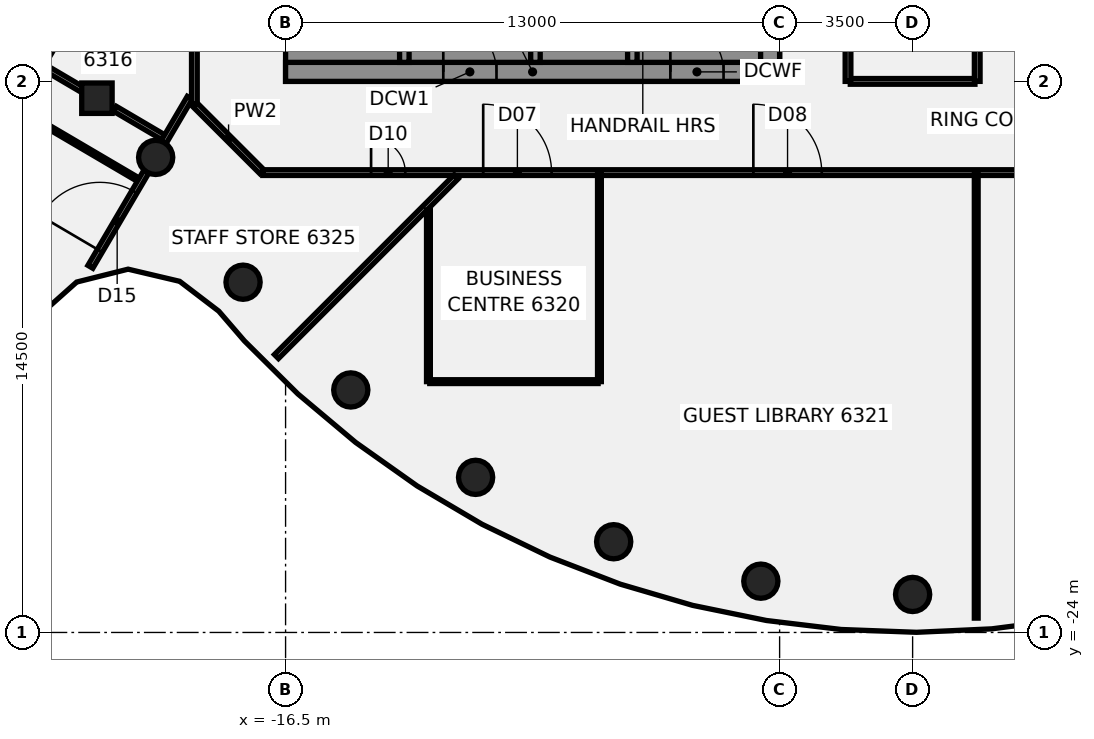
"""IFC4 building model, lengths in metres.
Left out: names, types, materials, properties, quantities, classifications, styles, units other than length and angle.
Written with IfcOpenShell. Run it as: python <this file> out.ifc"""

import sys

from ifc_helpers import new_model, si_unit, direction, frame, frame_2d, origin, origin_2d, place, context, subcontext, project, spatial, polyline, rectangle, circle, outline, extrude, element, fill, save


model = new_model("IFC4")
c1 = context("Model", 3, precision=1e-05, world=origin(), true_north=direction((0.0, 1.0)))
c2 = subcontext(c1, "Body", "Model", "MODEL_VIEW")
j1 = project(units=[si_unit("LENGTHUNIT", "METRE"), si_unit("PLANEANGLEUNIT", "RADIAN")], contexts=[c1])
p1 = place(None, origin())
s1 = spatial("IfcSite", under=j1, at=p1, CompositionType="ELEMENT")
p2 = place(p1, origin())
s2 = spatial("IfcBuilding", under=s1, at=p2, CompositionType="ELEMENT")
p3 = place(p2, frame((0.0, 0.0, 248.7)))
s3 = spatial("IfcBuildingStorey", under=s2, at=p3, CompositionType="ELEMENT", Elevation=248.7)
for number, where, z_axis, x_axis in (
    (1, (-19.919, -11.5, -0.14), (0.0, 0.0, 1.0), (1.0, 0.0, 0.0)),
    (2, (-17.619, -14.784, -0.14), (0.0, 0.0, 1.0), (1.0, 0.0, 0.0)),
    (3, (-14.784, -17.619, -0.14), (0.0, 0.0, 1.0), (1.0, 0.0, 0.0)),
    (4, (-11.5, -19.919, -0.14), (0.0, 0.0, 1.0), (1.0, 0.0, 0.0)),
    (5, (-7.866, -21.613, -0.14), (0.0, 0.0, 1.0), (1.0, 0.0, 0.0)),
    (6, (-3.994, -22.651, -0.14), (0.0, 0.0, 1.0), (1.0, 0.0, 0.0)),
    (7, (0.0, -23.0, -0.14), (0.0, 0.0, 1.0), (1.0, 0.0, 0.0)),
):
    element("IfcColumn", number, at=place(p3, frame(where, z_axis=z_axis, x_axis=x_axis)), inside=s3, PredefinedType="COLUMN", context=c2, shape_type="SweptSolid", body=[
        extrude(circle(Radius=0.45, at=origin_2d()), origin(), (0.0, 0.0, 1.0), 3.56),
    ])
p4 = place(p3, frame((-21.464, -9.942, -0.139), z_axis=(0.050846736046, 0.003165020106, 0.998701452928), x_axis=(-0.860634932562, 0.507470099414, 0.042209134729)))
e8 = element("IfcColumn", 8, at=p4, inside=s3, PredefinedType="COLUMN", context=c2, shape_type="SweptSolid", body=[
    extrude(rectangle(XDim=0.8, YDim=0.8, at=origin_2d()), origin(), (0.0, 0.0, 1.0), 3.548),
])
p5 = place(p3, frame((-18.872, -10.128, 0.0), z_axis=(0.0, 0.0, 1.0), x_axis=(0.707106781187, -0.707106781187, 0.0)))
e9 = element("IfcWall", 9, at=p5, inside=s3, PredefinedType="PARTITIONING", context=c2, shape_type="SweptSolid", body=[
    extrude(rectangle(XDim=2.465, YDim=0.15, at=frame_2d((1.232, 0.0))), origin(), (0.0, 0.0, 1.0), 2.824),
])
p6 = place(p3, frame((-27.865, -7.687, 0.0), z_axis=(0.0, 0.0, 1.0), x_axis=(0.862208691121, -0.506553228156, 0.0)))
e10 = element("IfcWall", 10, at=p6, inside=s3, PredefinedType="PARTITIONING", context=c2, shape_type="SweptSolid", body=[
    extrude(rectangle(XDim=8.685, YDim=0.1, at=frame_2d((4.343, 0.0))), origin(), (0.0, 0.0, 1.0), 2.82),
])
p7 = place(p3, frame((-26.857, -6.773, 0.0), z_axis=(0.0, 0.0, 1.0), x_axis=(0.862091797668, -0.506752140985, 0.0)))
e11 = element("IfcWall", 11, at=p7, inside=s3, PredefinedType="PARTITIONING", context=c2, shape_type="SweptSolid", body=[
    extrude(rectangle(XDim=5.853, YDim=0.15, at=frame_2d((2.927, 0.0))), origin(), (0.0, 0.0, 1.0), 2.82),
])
p8 = place(p3, frame((-20.99, -10.222, 0.0), z_axis=(0.0, 0.0, 1.0), x_axis=(0.862134928998, -0.506678758388, 0.0)))
e12 = element("IfcWall", 12, at=p8, inside=s3, PredefinedType="PARTITIONING", context=c2, shape_type="SweptSolid", body=[
    extrude(rectangle(XDim=1.469, YDim=0.15, at=frame_2d((0.735, 0.0))), origin(), (0.0, 0.0, 1.0), 2.82),
])
p9 = place(p3, frame((-17.1, -11.9, 0.0), z_axis=(0.0, 0.0, 1.0), x_axis=(1.0, 0.0, 0.0)))
e13 = element("IfcWall", 13, at=p9, inside=s3, PredefinedType="PARTITIONING", context=c2, shape_type="SweptSolid", body=[
    extrude(rectangle(XDim=34.165, YDim=0.15, at=frame_2d((17.083, 0.0))), origin(), (0.0, 0.0, 1.0), 2.824),
])
p10 = place(p9, frame((5.8, 0.0, 0.0)))
e14 = element("IfcOpeningElement", 14, at=p10, cuts=e13, PredefinedType="OPENING", context=c2, shape_type="SweptSolid", body=[
    extrude(rectangle(XDim=1.8, YDim=2.1, at=frame_2d((0.9, 1.05))), frame((0.0, 0.085, 0.0), z_axis=(0.0, -1.0, 0.0), x_axis=(1.0, 0.0, 0.0)), (0.0, 0.0, 1.0), 0.17),
])
p11 = place(p9, frame((12.909, 0.0, 0.0)))
e15 = element("IfcOpeningElement", 15, at=p11, cuts=e13, PredefinedType="OPENING", context=c2, shape_type="SweptSolid", body=[
    extrude(rectangle(XDim=1.8, YDim=2.1, at=frame_2d((0.9, 1.05))), frame((0.0, 0.085, 0.0), z_axis=(0.0, -1.0, 0.0), x_axis=(1.0, 0.0, 0.0)), (0.0, 0.0, 1.0), 0.17),
])
p12 = place(p9, frame((22.974, 0.0, 0.0)))
e16 = element("IfcOpeningElement", 16, at=p12, cuts=e13, PredefinedType="OPENING", context=c2, shape_type="SweptSolid", body=[
    extrude(rectangle(XDim=1.8, YDim=2.1, at=frame_2d((0.9, 1.05))), frame((0.0, 0.085, 0.0), z_axis=(0.0, -1.0, 0.0), x_axis=(1.0, 0.0, 0.0)), (0.0, 0.0, 1.0), 0.17),
])
p13 = place(p9, frame((2.85, 0.0, 0.0)))
e17 = element("IfcOpeningElement", 17, at=p13, cuts=e13, PredefinedType="OPENING", context=c2, shape_type="SweptSolid", body=[
    extrude(rectangle(XDim=0.9, YDim=2.1, at=frame_2d((0.45, 1.05))), frame((0.0, 0.085, 0.0), z_axis=(0.0, -1.0, 0.0), x_axis=(1.0, 0.0, 0.0)), (0.0, 0.0, 1.0), 0.17),
])
p14 = place(p3, frame((-12.706, -17.4, 0.0), z_axis=(0.0, 0.0, 1.0), x_axis=(1.0, 0.0, 0.0)))
e18 = element("IfcWall", 18, at=p14, inside=s3, PredefinedType="PARTITIONING", context=c2, shape_type="SweptSolid", body=[
    extrude(rectangle(XDim=4.43, YDim=0.1, at=frame_2d((2.215, 0.0))), origin(), (0.0, 0.0, 1.0), 2.824),
])
p15 = place(p3, frame((-1.64, -9.5, 0.0), z_axis=(0.0, 0.0, 1.0), x_axis=(1.0, 0.0, 0.0)))
e19 = element("IfcWall", 19, at=p15, inside=s3, PredefinedType="PARTITIONING", context=c2, shape_type="SweptSolid", body=[
    extrude(rectangle(XDim=3.28, YDim=0.15, at=frame_2d((1.64, 0.0))), origin(), (0.0, 0.0, 1.0), 2.824),
])
p16 = place(p3, frame((-16.74, -16.74, 0.0), z_axis=(0.0, 0.0, 1.0), x_axis=(0.707106781187, 0.707106781187, 0.0)))
e20 = element("IfcWall", 20, at=p16, inside=s3, PredefinedType="PARTITIONING", context=c2, shape_type="SweptSolid", body=[
    extrude(rectangle(XDim=6.691, YDim=0.15, at=frame_2d((3.345, 0.0))), origin(), (0.0, 0.0, 1.0), 2.824),
])
p17 = place(p3, frame((-22.892, -9.016, 0.0), z_axis=(0.0, 0.0, 1.0), x_axis=(0.506789195044, 0.862070015594, 0.0)))
e21 = element("IfcWall", 21, at=p17, inside=s3, PredefinedType="PARTITIONING", context=c2, shape_type="SweptSolid", body=[
    extrude(rectangle(XDim=2.125, YDim=0.15, at=frame_2d((1.063, 0.0))), origin(), (0.0, 0.0, 1.0), 2.72),
])
p18 = place(p3, frame((-21.637, -14.379, 0.0), z_axis=(0.0, 0.0, 1.0), x_axis=(0.506773579249, 0.862079195536, 0.0)))
e22 = element("IfcWall", 22, at=p18, inside=s3, PredefinedType="PARTITIONING", context=c2, shape_type="SweptSolid", body=[
    extrude(rectangle(XDim=2.9, YDim=0.15, at=frame_2d((1.45, 0.0))), origin(), (0.0, 0.0, 1.0), 2.824),
])
p19 = place(p18, frame((0.491, 0.0, 0.0)))
e23 = element("IfcOpeningElement", 23, at=p19, cuts=e22, PredefinedType="OPENING", context=c2, shape_type="SweptSolid", body=[
    extrude(rectangle(XDim=1.8, YDim=2.1, at=frame_2d((0.9, 1.05))), frame((0.0, 0.085, 0.0), z_axis=(0.0, -1.0, 0.0), x_axis=(1.0, 0.0, 0.0)), (0.0, 0.0, 1.0), 0.17),
])
p20 = place(p3, frame((-19.707, -11.097, 0.0), z_axis=(0.0, 0.0, 1.0), x_axis=(0.506775518667, 0.862078055445, 0.0)))
e24 = element("IfcWall", 24, at=p20, inside=s3, PredefinedType="PARTITIONING", context=c2, shape_type="SweptSolid", body=[
    extrude(rectangle(XDim=1.352, YDim=0.15, at=frame_2d((0.676, 0.0))), origin(), (0.0, 0.0, 1.0), 2.824),
])
p21 = place(p3, frame((-18.9, -10.1, 0.0), z_axis=(0.0, 0.0, 1.0), x_axis=(0.0, 1.0, 0.0)))
e25 = element("IfcWall", 25, at=p21, inside=s3, PredefinedType="PARTITIONING", context=c2, shape_type="SweptSolid", body=[
    extrude(rectangle(XDim=20.2, YDim=0.15, at=frame_2d((10.1, 0.0))), origin(), (0.0, 0.0, 1.0), 2.824),
])
p22 = place(p21, frame((14.767, 0.0, 0.0)))
e26 = element("IfcOpeningElement", 26, at=p22, cuts=e25, PredefinedType="OPENING", context=c2, shape_type="SweptSolid", body=[
    extrude(rectangle(XDim=1.8, YDim=2.1, at=frame_2d((0.9, 1.05))), frame((0.0, 0.085, 0.0), z_axis=(0.0, -1.0, 0.0), x_axis=(1.0, 0.0, 0.0)), (0.0, 0.0, 1.0), 0.17),
])
p23 = place(p21, frame((6.12, 0.0, 0.0)))
e27 = element("IfcOpeningElement", 27, at=p23, cuts=e25, PredefinedType="OPENING", context=c2, shape_type="SweptSolid", body=[
    extrude(rectangle(XDim=1.8, YDim=2.1, at=frame_2d((0.9, 1.05))), frame((0.0, 0.085, 0.0), z_axis=(0.0, -1.0, 0.0), x_axis=(1.0, 0.0, 0.0)), (0.0, 0.0, 1.0), 0.17),
])
p24 = place(p21, frame((2.026, 0.0, 0.0)))
e28 = element("IfcOpeningElement", 28, at=p24, cuts=e25, PredefinedType="OPENING", context=c2, shape_type="SweptSolid", body=[
    extrude(rectangle(XDim=0.9, YDim=2.1, at=frame_2d((0.45, 1.05))), frame((0.0, 0.085, 0.0), z_axis=(0.0, -1.0, 0.0), x_axis=(1.0, 0.0, 0.0)), (0.0, 0.0, 1.0), 0.17),
])
p25 = place(p3, frame((-12.741, -17.4, 0.0), z_axis=(0.0, 0.0, 1.0), x_axis=(0.0, 1.0, 0.0)))
e29 = element("IfcWall", 29, at=p25, inside=s3, PredefinedType="PARTITIONING", context=c2, shape_type="SweptSolid", body=[
    extrude(rectangle(XDim=4.519, YDim=0.1, at=frame_2d((2.259, 0.0))), origin(), (0.0, 0.0, 1.0), 2.824),
])
p26 = place(p3, frame((-8.241, -17.4, 0.0), z_axis=(0.0, 0.0, 1.0), x_axis=(0.0, 1.0, 0.0)))
e30 = element("IfcWall", 30, at=p26, inside=s3, PredefinedType="PARTITIONING", context=c2, shape_type="SweptSolid", body=[
    extrude(rectangle(XDim=5.445, YDim=0.1, at=frame_2d((2.722, 0.0))), origin(), (0.0, 0.0, 1.0), 2.824),
])
p27 = place(p3, frame((-1.7, -9.5, 0.0), z_axis=(0.0, 0.0, 1.0), x_axis=(0.0, 1.0, 0.0)))
e31 = element("IfcWall", 31, at=p27, inside=s3, PredefinedType="PARTITIONING", context=c2, shape_type="SweptSolid", body=[
    extrude(rectangle(XDim=19.0, YDim=0.15, at=frame_2d((9.5, 0.0))), origin(), (0.0, 0.0, 1.0), 2.824),
])
p28 = place(p27, frame((3.75, 0.0, 0.0)))
e32 = element("IfcOpeningElement", 32, at=p28, cuts=e31, PredefinedType="OPENING", context=c2, shape_type="SweptSolid", body=[
    extrude(rectangle(XDim=1.8, YDim=2.1, at=frame_2d((0.9, 1.05))), frame((0.0, 0.085, 0.0), z_axis=(0.0, -1.0, 0.0), x_axis=(1.0, 0.0, 0.0)), (0.0, 0.0, 1.0), 0.17),
])
p29 = place(p27, frame((10.8, 0.0, 0.0)))
e33 = element("IfcOpeningElement", 33, at=p29, cuts=e31, PredefinedType="OPENING", context=c2, shape_type="SweptSolid", body=[
    extrude(rectangle(XDim=1.8, YDim=2.1, at=frame_2d((0.9, 1.05))), frame((0.0, 0.085, 0.0), z_axis=(0.0, -1.0, 0.0), x_axis=(1.0, 0.0, 0.0)), (0.0, 0.0, 1.0), 0.17),
])
p30 = place(p3, frame((1.674, -23.623, 0.0), z_axis=(0.0, 0.0, 1.0), x_axis=(0.0, 1.0, 0.0)))
e34 = element("IfcWall", 34, at=p30, inside=s3, PredefinedType="PARTITIONING", context=c2, shape_type="SweptSolid", body=[
    extrude(rectangle(XDim=11.668, YDim=0.1, at=frame_2d((5.834, 0.0))), origin(), (0.0, 0.0, 1.0), 2.824),
])
p31 = place(p3, frame((1.7, -9.5, 0.0), z_axis=(0.0, 0.0, 1.0), x_axis=(0.0, 1.0, 0.0)))
e35 = element("IfcWall", 35, at=p31, inside=s3, PredefinedType="PARTITIONING", context=c2, shape_type="SweptSolid", body=[
    extrude(rectangle(XDim=19.0, YDim=0.15, at=frame_2d((9.5, 0.0))), origin(), (0.0, 0.0, 1.0), 2.824),
])
p32 = place(p3, frame((-16.5, -9.25, 0.0), z_axis=(0.0, 0.0, 1.0), x_axis=(1.0, 0.0, 0.0)))
e36 = element("IfcWall", 36, at=p32, inside=s3, PredefinedType="SHEAR", context=c2, shape_type="SweptSolid", body=[
    extrude(rectangle(XDim=13.0, YDim=0.5, at=frame_2d((6.5, 0.0))), origin(), (0.0, 0.0, 1.0), 3.42),
])
p33 = place(p32, frame((4.15, 0.0, 0.0)))
e37 = element("IfcOpeningElement", 37, at=p33, cuts=e36, PredefinedType="OPENING", context=c2, shape_type="SweptSolid", body=[
    extrude(rectangle(XDim=1.4, YDim=2.1, at=frame_2d((0.7, 1.05))), frame((0.0, 0.26, 0.0), z_axis=(0.0, -1.0, 0.0), x_axis=(1.0, 0.0, 0.0)), (0.0, 0.0, 1.0), 0.52),
])
p34 = place(p32, frame((10.125, 0.0, 0.0)))
e38 = element("IfcOpeningElement", 38, at=p34, cuts=e36, PredefinedType="OPENING", context=c2, shape_type="SweptSolid", body=[
    extrude(rectangle(XDim=1.4, YDim=2.1, at=frame_2d((0.7, 1.05))), frame((0.0, 0.26, 0.0), z_axis=(0.0, -1.0, 0.0), x_axis=(1.0, 0.0, 0.0)), (0.0, 0.0, 1.0), 0.52),
])
p35 = place(p3, origin())
e39 = element("IfcWall", 39, at=p35, inside=s3, PredefinedType="SHEAR", context=c2, shape_type="SweptSolid", body=[
    extrude(outline(polyline([(-13.5, -8.125), (-16.0, -8.125), (-16.0, -5.625), (-13.5, -5.625), (-13.5, -5.375), (-16.0, -5.375), (-16.0, 5.375), (-13.5, 5.375), (-13.5, 5.625), (-16.0, 5.625), (-16.0, 8.125), (-13.5, 8.125), (-13.5, 9.0), (-16.0, 9.0), (-16.5, 9.0), (-16.5, -9.0), (-16.0, -9.0), (-13.5, -9.0), (-13.5, -8.125)])), origin(), (0.0, 0.0, 1.0), 3.42),
])
p36 = place(p3, origin())
e40 = element("IfcWall", 40, at=p36, inside=s3, PredefinedType="SHEAR", context=c2, shape_type="SweptSolid", body=[
    extrude(outline(polyline([(-7.5, -8.125), (-9.55, -8.125), (-9.55, -5.625), (-9.8, -5.625), (-9.8, -8.125), (-9.8, -9.0), (-7.5, -9.0), (-7.5, -8.125)])), origin(), (0.0, 0.0, 1.0), 3.42),
])
p37 = place(p3, frame((-7.375, -9.0, 0.0), z_axis=(0.0, 0.0, 1.0), x_axis=(0.0, 1.0, 0.0)))
e41 = element("IfcWall", 41, at=p37, inside=s3, PredefinedType="SHEAR", context=c2, shape_type="SweptSolid", body=[
    extrude(rectangle(XDim=0.875, YDim=0.25, at=frame_2d((0.438, 0.0))), origin(), (0.0, 0.0, 1.0), 3.42),
])
p38 = place(p3, frame((-13.375, -9.0, 0.0), z_axis=(0.0, 0.0, 1.0), x_axis=(0.0, 1.0, 0.0)))
e42 = element("IfcWall", 42, at=p38, inside=s3, PredefinedType="SHEAR", context=c2, shape_type="SweptSolid", body=[
    extrude(rectangle(XDim=18.0, YDim=0.25, at=frame_2d((9.0, 0.0))), origin(), (0.0, 0.0, 1.0), 3.42),
])
p39 = place(p38, frame((1.425, 0.0, 0.0)))
e43 = element("IfcOpeningElement", 43, at=p39, cuts=e42, PredefinedType="OPENING", context=c2, shape_type="SweptSolid", body=[
    extrude(rectangle(XDim=1.4, YDim=2.1, at=frame_2d((0.7, 1.05))), frame((0.0, 0.135, 0.0), z_axis=(0.0, -1.0, 0.0), x_axis=(1.0, 0.0, 0.0)), (0.0, 0.0, 1.0), 0.27),
])
p40 = place(p38, frame((6.646, 0.0, 0.0)))
e44 = element("IfcOpeningElement", 44, at=p40, cuts=e42, PredefinedType="OPENING", context=c2, shape_type="SweptSolid", body=[
    extrude(rectangle(XDim=1.0, YDim=2.1, at=frame_2d((0.5, 1.05))), frame((0.0, 0.135, 0.0), z_axis=(0.0, -1.0, 0.0), x_axis=(1.0, 0.0, 0.0)), (0.0, 0.0, 1.0), 0.27),
])
p41 = place(p38, frame((12.146, 0.0, 0.0)))
e45 = element("IfcOpeningElement", 45, at=p41, cuts=e42, PredefinedType="OPENING", context=c2, shape_type="SweptSolid", body=[
    extrude(rectangle(XDim=1.0, YDim=2.1, at=frame_2d((0.5, 1.05))), frame((0.0, 0.135, 0.0), z_axis=(0.0, -1.0, 0.0), x_axis=(1.0, 0.0, 0.0)), (0.0, 0.0, 1.0), 0.27),
])
p42 = place(p3, frame((-9.925, -9.0, 0.0), z_axis=(0.0, 0.0, 1.0), x_axis=(0.0, 1.0, 0.0)))
e46 = element("IfcWall", 46, at=p42, inside=s3, PredefinedType="SHEAR", context=c2, shape_type="SweptSolid", body=[
    extrude(rectangle(XDim=18.0, YDim=0.25, at=frame_2d((9.0, 0.0))), origin(), (0.0, 0.0, 1.0), 3.42),
])
p43 = place(p42, frame((12.575, 0.0, 0.0)))
e47 = element("IfcOpeningElement", 47, at=p43, cuts=e46, PredefinedType="OPENING", context=c2, shape_type="SweptSolid", body=[
    extrude(rectangle(XDim=1.1, YDim=2.1, at=frame_2d((0.55, 1.05))), frame((0.0, 0.135, 0.0), z_axis=(0.0, -1.0, 0.0), x_axis=(1.0, 0.0, 0.0)), (0.0, 0.0, 1.0), 0.27),
])
p44 = place(p42, frame((15.325, 0.0, 0.0)))
e48 = element("IfcOpeningElement", 48, at=p44, cuts=e46, PredefinedType="OPENING", context=c2, shape_type="SweptSolid", body=[
    extrude(rectangle(XDim=1.1, YDim=2.1, at=frame_2d((0.55, 1.05))), frame((0.0, 0.135, 0.0), z_axis=(0.0, -1.0, 0.0), x_axis=(1.0, 0.0, 0.0)), (0.0, 0.0, 1.0), 0.27),
])
p45 = place(p42, frame((4.812, 0.0, 0.0)))
e49 = element("IfcOpeningElement", 49, at=p45, cuts=e46, PredefinedType="OPENING", context=c2, shape_type="SweptSolid", body=[
    extrude(rectangle(XDim=1.0, YDim=2.1, at=frame_2d((0.5, 1.05))), frame((0.0, 0.135, 0.0), z_axis=(0.0, -1.0, 0.0), x_axis=(1.0, 0.0, 0.0)), (0.0, 0.0, 1.0), 0.27),
])
p46 = place(p42, frame((7.562, 0.0, 0.0)))
e50 = element("IfcOpeningElement", 50, at=p46, cuts=e46, PredefinedType="OPENING", context=c2, shape_type="SweptSolid", body=[
    extrude(rectangle(XDim=1.0, YDim=2.1, at=frame_2d((0.5, 1.05))), frame((0.0, 0.135, 0.0), z_axis=(0.0, -1.0, 0.0), x_axis=(1.0, 0.0, 0.0)), (0.0, 0.0, 1.0), 0.27),
])
p47 = place(p42, frame((9.396, 0.0, 0.0)))
e51 = element("IfcOpeningElement", 51, at=p47, cuts=e46, PredefinedType="OPENING", context=c2, shape_type="SweptSolid", body=[
    extrude(rectangle(XDim=1.0, YDim=2.1, at=frame_2d((0.5, 1.05))), frame((0.0, 0.135, 0.0), z_axis=(0.0, -1.0, 0.0), x_axis=(1.0, 0.0, 0.0)), (0.0, 0.0, 1.0), 0.27),
])
p48 = place(p42, frame((10.771, 0.0, 0.0)))
e52 = element("IfcOpeningElement", 52, at=p48, cuts=e46, PredefinedType="OPENING", context=c2, shape_type="SweptSolid", body=[
    extrude(rectangle(XDim=1.0, YDim=2.1, at=frame_2d((0.5, 1.05))), frame((0.0, 0.135, 0.0), z_axis=(0.0, -1.0, 0.0), x_axis=(1.0, 0.0, 0.0)), (0.0, 0.0, 1.0), 0.27),
])
p49 = place(p3, frame((-3.75, -9.0, 0.0), z_axis=(0.0, 0.0, 1.0), x_axis=(0.0, 1.0, 0.0)))
e53 = element("IfcWall", 53, at=p49, inside=s3, PredefinedType="SHEAR", context=c2, shape_type="SweptSolid", body=[
    extrude(rectangle(XDim=18.0, YDim=0.5, at=frame_2d((9.0, 0.0))), origin(), (0.0, 0.0, 1.0), 3.42),
])
p50 = place(p49, frame((1.35, 0.0, 0.0)))
e54 = element("IfcOpeningElement", 54, at=p50, cuts=e53, PredefinedType="OPENING", context=c2, shape_type="SweptSolid", body=[
    extrude(rectangle(XDim=1.8, YDim=2.1, at=frame_2d((0.9, 1.05))), frame((0.0, 0.26, 0.0), z_axis=(0.0, -1.0, 0.0), x_axis=(1.0, 0.0, 0.0)), (0.0, 0.0, 1.0), 0.52),
])
p51 = place(p49, frame((11.798, 0.0, 0.0)))
e55 = element("IfcOpeningElement", 55, at=p51, cuts=e53, PredefinedType="OPENING", context=c2, shape_type="SweptSolid", body=[
    extrude(rectangle(XDim=1.0, YDim=2.1, at=frame_2d((0.5, 1.05))), frame((0.0, 0.26, 0.0), z_axis=(0.0, -1.0, 0.0), x_axis=(1.0, 0.0, 0.0)), (0.0, 0.0, 1.0), 0.52),
])
p52 = place(p49, frame((15.323, 0.0, 0.0)))
e56 = element("IfcOpeningElement", 56, at=p52, cuts=e53, PredefinedType="OPENING", context=c2, shape_type="SweptSolid", body=[
    extrude(rectangle(XDim=1.0, YDim=2.1, at=frame_2d((0.5, 1.05))), frame((0.0, 0.26, 0.0), z_axis=(0.0, -1.0, 0.0), x_axis=(1.0, 0.0, 0.0)), (0.0, 0.0, 1.0), 0.52),
])
p53 = place(p10, frame((1.8, 0.0, 0.0), z_axis=(0.0, 0.0, 1.0), x_axis=(-1.0, 0.0, 0.0)))
e57 = element("IfcDoor", 57, at=p53, inside=s3, OperationType="DOUBLE_DOOR_SINGLE_SWING", PredefinedType="DOOR", context=c2, shape_type="SweptSolid", body=[
    extrude(rectangle(XDim=1.8, YDim=2.1, at=frame_2d((0.9, 1.05))), frame((0.0, 0.025, 0.0), z_axis=(0.0, -1.0, 0.0), x_axis=(1.0, 0.0, 0.0)), (0.0, 0.0, 1.0), 0.05),
])
fill(e14, e57)
p54 = place(p11, frame((1.8, 0.0, 0.0), z_axis=(0.0, 0.0, 1.0), x_axis=(-1.0, 0.0, 0.0)))
e58 = element("IfcDoor", 58, at=p54, inside=s3, OperationType="DOUBLE_DOOR_SINGLE_SWING", PredefinedType="DOOR", context=c2, shape_type="SweptSolid", body=[
    extrude(rectangle(XDim=1.8, YDim=2.1, at=frame_2d((0.9, 1.05))), frame((0.0, 0.025, 0.0), z_axis=(0.0, -1.0, 0.0), x_axis=(1.0, 0.0, 0.0)), (0.0, 0.0, 1.0), 0.05),
])
fill(e15, e58)
p55 = place(p13, frame((0.9, 0.0, 0.0), z_axis=(0.0, 0.0, 1.0), x_axis=(-1.0, 0.0, 0.0)))
e59 = element("IfcDoor", 59, at=p55, inside=s3, OperationType="SINGLE_SWING_LEFT", PredefinedType="DOOR", context=c2, shape_type="SweptSolid", body=[
    extrude(rectangle(XDim=0.9, YDim=2.1, at=frame_2d((0.45, 1.05))), frame((0.0, 0.025, 0.0), z_axis=(0.0, -1.0, 0.0), x_axis=(1.0, 0.0, 0.0)), (0.0, 0.0, 1.0), 0.05),
])
fill(e17, e59)
p56 = place(p19, origin())
e60 = element("IfcDoor", 60, at=p56, inside=s3, OperationType="DOUBLE_DOOR_SINGLE_SWING", PredefinedType="DOOR", context=c2, shape_type="SweptSolid", body=[
    extrude(rectangle(XDim=1.8, YDim=2.1, at=frame_2d((0.9, 1.05))), frame((0.0, 0.025, 0.0), z_axis=(0.0, -1.0, 0.0), x_axis=(1.0, 0.0, 0.0)), (0.0, 0.0, 1.0), 0.05),
])
fill(e23, e60)
p57 = place(p33, origin())
e61 = element("IfcDoor", 61, at=p57, inside=s3, OperationType="SINGLE_SWING_LEFT", PredefinedType="DOOR", context=c2, shape_type="SweptSolid", body=[
    extrude(rectangle(XDim=1.4, YDim=2.1, at=frame_2d((0.7, 1.05))), frame((0.0, 0.025, 0.0), z_axis=(0.0, -1.0, 0.0), x_axis=(1.0, 0.0, 0.0)), (0.0, 0.0, 1.0), 0.05),
])
fill(e37, e61)
p58 = place(p34, origin())
e62 = element("IfcDoor", 62, at=p58, inside=s3, OperationType="SINGLE_SWING_LEFT", PredefinedType="DOOR", context=c2, shape_type="SweptSolid", body=[
    extrude(rectangle(XDim=1.4, YDim=2.1, at=frame_2d((0.7, 1.05))), frame((0.0, 0.025, 0.0), z_axis=(0.0, -1.0, 0.0), x_axis=(1.0, 0.0, 0.0)), (0.0, 0.0, 1.0), 0.05),
])
fill(e38, e62)
save(model, sys.argv[1])
